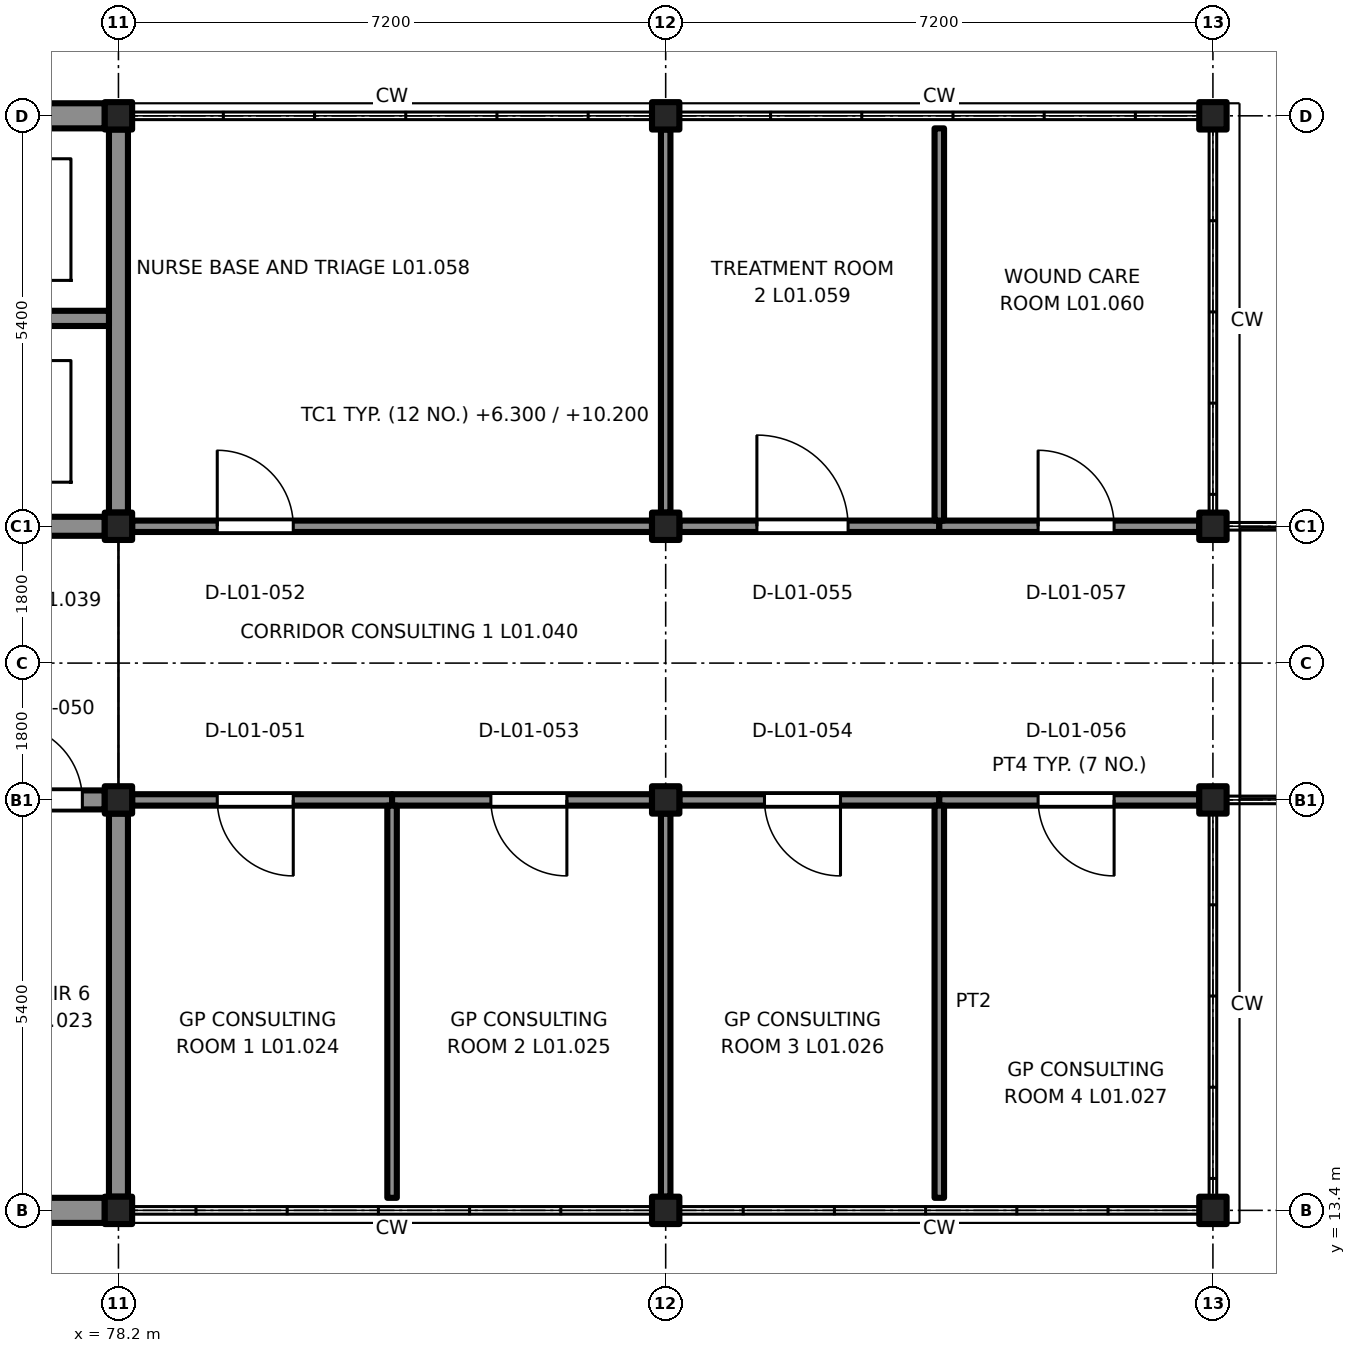
"""IFC4 building model, lengths in metres.
Left out: names, types, materials, properties, quantities, classifications, styles, units other than length and angle.
Written with IfcOpenShell. Run it as: python <this file> out.ifc"""

import sys

from ifc_helpers import new_model, si_unit, direction, frame, frame_2d, origin, origin_2d, place, context, subcontext, project, spatial, rectangle, extrude, element, fill, save


model = new_model("IFC4")
c1 = context("Model", 3, precision=1e-05, world=origin(), true_north=direction((0.0, 1.0)))
c2 = subcontext(c1, "Body", "Model", "MODEL_VIEW")
j1 = project(units=[si_unit("LENGTHUNIT", "METRE"), si_unit("PLANEANGLEUNIT", "RADIAN")], contexts=[c1])
p1 = place(None, origin())
s1 = spatial("IfcSite", under=j1, at=p1, CompositionType="ELEMENT")
p2 = place(p1, origin())
s2 = spatial("IfcBuilding", under=s1, at=p2, CompositionType="ELEMENT")
p3 = place(p2, frame((0.0, 0.0, 6.3)))
s3 = spatial("IfcBuildingStorey", under=s2, at=p3, CompositionType="ELEMENT", Elevation=6.3)
for number, where, z_axis, x_axis in (
    (1, (78.2, 13.4, 0.0), (0.0, 0.0, 1.0), (1.0, 0.0, 0.0)),
    (2, (78.2, 18.8, 0.0), (0.0, 0.0, 1.0), (1.0, 0.0, 0.0)),
    (3, (78.2, 22.4, 0.0), (0.0, 0.0, 1.0), (1.0, 0.0, 0.0)),
    (4, (78.2, 27.8, 0.0), (0.0, 0.0, 1.0), (1.0, 0.0, 0.0)),
    (5, (85.4, 13.4, 0.0), (0.0, 0.0, 1.0), (1.0, 0.0, 0.0)),
    (6, (85.4, 18.8, 0.0), (0.0, 0.0, 1.0), (1.0, 0.0, 0.0)),
    (7, (85.4, 22.4, 0.0), (0.0, 0.0, 1.0), (1.0, 0.0, 0.0)),
    (8, (85.4, 27.8, 0.0), (0.0, 0.0, 1.0), (1.0, 0.0, 0.0)),
    (9, (92.6, 13.4, 0.0), (0.0, 0.0, 1.0), (1.0, 0.0, 0.0)),
    (10, (92.6, 18.8, 0.0), (0.0, 0.0, 1.0), (1.0, 0.0, 0.0)),
    (11, (92.6, 22.4, 0.0), (0.0, 0.0, 1.0), (1.0, 0.0, 0.0)),
    (12, (92.6, 27.8, 0.0), (0.0, 0.0, 1.0), (1.0, 0.0, 0.0)),
):
    element("IfcColumn", number, at=place(p3, frame(where, z_axis=z_axis, x_axis=x_axis)), inside=s3, PredefinedType="COLUMN", context=c2, shape_type="SweptSolid", body=[
        extrude(rectangle(XDim=0.36, YDim=0.36, at=origin_2d()), origin(), (0.0, 0.0, 1.0), 3.9),
    ])
p4 = place(p3, frame((71.165, 18.8, 0.0), z_axis=(0.0, 0.0, 1.0), x_axis=(1.0, 0.0, 0.0)))
e13 = element("IfcWall", 13, at=p4, inside=s3, PredefinedType="SHEAR", context=c2, shape_type="SweptSolid", body=[
    extrude(rectangle(XDim=6.855, YDim=0.25, at=frame_2d((3.427, 0.0))), origin(), (0.0, 0.0, 1.0), 3.65),
])
p5 = place(p4, frame((5.56, 0.0, 0.0)))
e14 = element("IfcOpeningElement", 14, at=p5, cuts=e13, PredefinedType="OPENING", context=c2, shape_type="SweptSolid", body=[
    extrude(rectangle(XDim=1.0, YDim=2.1, at=frame_2d((0.5, 1.05))), frame((0.0, 0.135, 0.0), z_axis=(0.0, -1.0, 0.0), x_axis=(1.0, 0.0, 0.0)), (0.0, 0.0, 1.0), 0.27),
])
p6 = place(p3, frame((78.2, 13.58, 0.0), z_axis=(0.0, 0.0, 1.0), x_axis=(0.0, 1.0, 0.0)))
e15 = element("IfcWall", 15, at=p6, inside=s3, PredefinedType="SHEAR", context=c2, shape_type="SweptSolid", body=[
    extrude(rectangle(XDim=5.04, YDim=0.25, at=frame_2d((2.52, 0.0))), origin(), (0.0, 0.0, 1.0), 3.65),
])
p7 = place(p3, frame((71.165, 22.4, 0.0), z_axis=(0.0, 0.0, 1.0), x_axis=(1.0, 0.0, 0.0)))
e16 = element("IfcWall", 16, at=p7, inside=s3, PredefinedType="SHEAR", context=c2, shape_type="SweptSolid", body=[
    extrude(rectangle(XDim=6.855, YDim=0.25, at=frame_2d((3.427, 0.0))), origin(), (0.0, 0.0, 1.0), 3.65),
])
p8 = place(p7, frame((0.955, 0.0, 0.0)))
e17 = element("IfcOpeningElement", 17, at=p8, cuts=e16, PredefinedType="OPENING", context=c2, shape_type="SweptSolid", body=[
    extrude(rectangle(XDim=1.8, YDim=2.1, at=frame_2d((0.9, 1.05))), frame((0.0, 0.135, 0.0), z_axis=(0.0, -1.0, 0.0), x_axis=(1.0, 0.0, 0.0)), (0.0, 0.0, 1.0), 0.27),
])
p9 = place(p3, frame((78.2, 22.58, 0.0), z_axis=(0.0, 0.0, 1.0), x_axis=(0.0, 1.0, 0.0)))
e18 = element("IfcWall", 18, at=p9, inside=s3, PredefinedType="SHEAR", context=c2, shape_type="SweptSolid", body=[
    extrude(rectangle(XDim=5.04, YDim=0.25, at=frame_2d((2.52, 0.0))), origin(), (0.0, 0.0, 1.0), 3.65),
])
p10 = place(p3, frame((78.075, 25.135, 0.0), z_axis=(0.0, 0.0, 1.0), x_axis=(-1.0, 0.0, 0.0)))
e19 = element("IfcWall", 19, at=p10, inside=s3, PredefinedType="SHEAR", context=c2, shape_type="SweptSolid", body=[
    extrude(rectangle(XDim=3.0, YDim=0.2, at=frame_2d((1.5, 0.0))), origin(), (0.0, 0.0, 1.0), 3.65),
])
for number, where, z_axis, x_axis in (
    (20, (78.02, 13.4, 0.0), (0.0, 0.0, 1.0), (-1.0, 0.0, 0.0)),
    (21, (75.5, 27.8, 0.0), (0.0, 0.0, 1.0), (1.0, 0.0, 0.0)),
):
    element("IfcWall", number, at=place(p3, frame(where, z_axis=z_axis, x_axis=x_axis)), inside=s3, PredefinedType="SOLIDWALL", context=c2, shape_type="SweptSolid", body=[
        extrude(rectangle(XDim=2.52, YDim=0.33, at=frame_2d((1.26, 0.0))), origin(), (0.0, 0.0, 1.0), 3.22),
    ])
p11 = place(p3, frame((81.8, 18.8, 0.0), z_axis=(0.0, 0.0, 1.0), x_axis=(-1.0, 0.0, 0.0)))
e22 = element("IfcWall", 22, at=p11, inside=s3, PredefinedType="PARTITIONING", context=c2, shape_type="SweptSolid", body=[
    extrude(rectangle(XDim=3.42, YDim=0.15, at=frame_2d((1.71, 0.0))), origin(), (0.0, 0.0, 1.0), 3.22),
])
p12 = place(p11, frame((1.3, 0.0, 0.0)))
e23 = element("IfcOpeningElement", 23, at=p12, cuts=e22, PredefinedType="OPENING", context=c2, shape_type="SweptSolid", body=[
    extrude(rectangle(XDim=1.0, YDim=2.1, at=frame_2d((0.5, 1.05))), frame((0.0, 0.085, 0.0), z_axis=(0.0, -1.0, 0.0), x_axis=(1.0, 0.0, 0.0)), (0.0, 0.0, 1.0), 0.17),
])
p13 = place(p3, frame((85.22, 18.8, 0.0), z_axis=(0.0, 0.0, 1.0), x_axis=(-1.0, 0.0, 0.0)))
e24 = element("IfcWall", 24, at=p13, inside=s3, PredefinedType="PARTITIONING", context=c2, shape_type="SweptSolid", body=[
    extrude(rectangle(XDim=3.42, YDim=0.15, at=frame_2d((1.71, 0.0))), origin(), (0.0, 0.0, 1.0), 3.22),
])
p14 = place(p13, frame((1.12, 0.0, 0.0)))
e25 = element("IfcOpeningElement", 25, at=p14, cuts=e24, PredefinedType="OPENING", context=c2, shape_type="SweptSolid", body=[
    extrude(rectangle(XDim=1.0, YDim=2.1, at=frame_2d((0.5, 1.05))), frame((0.0, 0.085, 0.0), z_axis=(0.0, -1.0, 0.0), x_axis=(1.0, 0.0, 0.0)), (0.0, 0.0, 1.0), 0.17),
])
p15 = place(p3, frame((81.8, 13.565, 0.0), z_axis=(0.0, 0.0, 1.0), x_axis=(0.0, 1.0, 0.0)))
e26 = element("IfcWall", 26, at=p15, inside=s3, PredefinedType="PARTITIONING", context=c2, shape_type="SweptSolid", body=[
    extrude(rectangle(XDim=5.16, YDim=0.125, at=frame_2d((2.58, 0.0))), origin(), (0.0, 0.0, 1.0), 3.38),
])
p16 = place(p3, frame((89.0, 18.8, 0.0), z_axis=(0.0, 0.0, 1.0), x_axis=(-1.0, 0.0, 0.0)))
e27 = element("IfcWall", 27, at=p16, inside=s3, PredefinedType="PARTITIONING", context=c2, shape_type="SweptSolid", body=[
    extrude(rectangle(XDim=3.42, YDim=0.15, at=frame_2d((1.71, 0.0))), origin(), (0.0, 0.0, 1.0), 3.22),
])
p17 = place(p16, frame((1.3, 0.0, 0.0)))
e28 = element("IfcOpeningElement", 28, at=p17, cuts=e27, PredefinedType="OPENING", context=c2, shape_type="SweptSolid", body=[
    extrude(rectangle(XDim=1.0, YDim=2.1, at=frame_2d((0.5, 1.05))), frame((0.0, 0.085, 0.0), z_axis=(0.0, -1.0, 0.0), x_axis=(1.0, 0.0, 0.0)), (0.0, 0.0, 1.0), 0.17),
])
p18 = place(p3, frame((85.4, 13.58, 0.0), z_axis=(0.0, 0.0, 1.0), x_axis=(0.0, 1.0, 0.0)))
e29 = element("IfcWall", 29, at=p18, inside=s3, PredefinedType="PARTITIONING", context=c2, shape_type="SweptSolid", body=[
    extrude(rectangle(XDim=5.04, YDim=0.125, at=frame_2d((2.52, 0.0))), origin(), (0.0, 0.0, 1.0), 3.38),
])
p19 = place(p3, frame((92.42, 18.8, 0.0), z_axis=(0.0, 0.0, 1.0), x_axis=(-1.0, 0.0, 0.0)))
e30 = element("IfcWall", 30, at=p19, inside=s3, PredefinedType="PARTITIONING", context=c2, shape_type="SweptSolid", body=[
    extrude(rectangle(XDim=3.42, YDim=0.15, at=frame_2d((1.71, 0.0))), origin(), (0.0, 0.0, 1.0), 3.22),
])
p20 = place(p19, frame((1.12, 0.0, 0.0)))
e31 = element("IfcOpeningElement", 31, at=p20, cuts=e30, PredefinedType="OPENING", context=c2, shape_type="SweptSolid", body=[
    extrude(rectangle(XDim=1.0, YDim=2.1, at=frame_2d((0.5, 1.05))), frame((0.0, 0.085, 0.0), z_axis=(0.0, -1.0, 0.0), x_axis=(1.0, 0.0, 0.0)), (0.0, 0.0, 1.0), 0.17),
])
p21 = place(p3, frame((89.0, 13.565, 0.0), z_axis=(0.0, 0.0, 1.0), x_axis=(0.0, 1.0, 0.0)))
e32 = element("IfcWall", 32, at=p21, inside=s3, PredefinedType="PARTITIONING", context=c2, shape_type="SweptSolid", body=[
    extrude(rectangle(XDim=5.16, YDim=0.125, at=frame_2d((2.58, 0.0))), origin(), (0.0, 0.0, 1.0), 3.38),
])
p22 = place(p3, frame((78.38, 22.4, 0.0), z_axis=(0.0, 0.0, 1.0), x_axis=(1.0, 0.0, 0.0)))
e33 = element("IfcWall", 33, at=p22, inside=s3, PredefinedType="PARTITIONING", context=c2, shape_type="SweptSolid", body=[
    extrude(rectangle(XDim=6.84, YDim=0.15, at=frame_2d((3.42, 0.0))), origin(), (0.0, 0.0, 1.0), 3.22),
])
p23 = place(p22, frame((1.12, 0.0, 0.0)))
e34 = element("IfcOpeningElement", 34, at=p23, cuts=e33, PredefinedType="OPENING", context=c2, shape_type="SweptSolid", body=[
    extrude(rectangle(XDim=1.0, YDim=2.1, at=frame_2d((0.5, 1.05))), frame((0.0, 0.085, 0.0), z_axis=(0.0, -1.0, 0.0), x_axis=(1.0, 0.0, 0.0)), (0.0, 0.0, 1.0), 0.17),
])
p24 = place(p3, frame((85.58, 22.4, 0.0), z_axis=(0.0, 0.0, 1.0), x_axis=(1.0, 0.0, 0.0)))
e35 = element("IfcWall", 35, at=p24, inside=s3, PredefinedType="PARTITIONING", context=c2, shape_type="SweptSolid", body=[
    extrude(rectangle(XDim=3.42, YDim=0.15, at=frame_2d((1.71, 0.0))), origin(), (0.0, 0.0, 1.0), 3.22),
])
p25 = place(p24, frame((1.02, 0.0, 0.0)))
e36 = element("IfcOpeningElement", 36, at=p25, cuts=e35, PredefinedType="OPENING", context=c2, shape_type="SweptSolid", body=[
    extrude(rectangle(XDim=1.2, YDim=2.1, at=frame_2d((0.6, 1.05))), frame((0.0, 0.085, 0.0), z_axis=(0.0, -1.0, 0.0), x_axis=(1.0, 0.0, 0.0)), (0.0, 0.0, 1.0), 0.17),
])
p26 = place(p3, frame((85.4, 27.62, 0.0), z_axis=(0.0, 0.0, 1.0), x_axis=(0.0, -1.0, 0.0)))
e37 = element("IfcWall", 37, at=p26, inside=s3, PredefinedType="PARTITIONING", context=c2, shape_type="SweptSolid", body=[
    extrude(rectangle(XDim=5.04, YDim=0.125, at=frame_2d((2.52, 0.0))), origin(), (0.0, 0.0, 1.0), 3.38),
])
p27 = place(p3, frame((89.0, 22.4, 0.0), z_axis=(0.0, 0.0, 1.0), x_axis=(1.0, 0.0, 0.0)))
e38 = element("IfcWall", 38, at=p27, inside=s3, PredefinedType="PARTITIONING", context=c2, shape_type="SweptSolid", body=[
    extrude(rectangle(XDim=3.42, YDim=0.15, at=frame_2d((1.71, 0.0))), origin(), (0.0, 0.0, 1.0), 3.22),
])
p28 = place(p27, frame((1.3, 0.0, 0.0)))
e39 = element("IfcOpeningElement", 39, at=p28, cuts=e38, PredefinedType="OPENING", context=c2, shape_type="SweptSolid", body=[
    extrude(rectangle(XDim=1.0, YDim=2.1, at=frame_2d((0.5, 1.05))), frame((0.0, 0.085, 0.0), z_axis=(0.0, -1.0, 0.0), x_axis=(1.0, 0.0, 0.0)), (0.0, 0.0, 1.0), 0.17),
])
p29 = place(p3, frame((89.0, 27.635, 0.0), z_axis=(0.0, 0.0, 1.0), x_axis=(0.0, -1.0, 0.0)))
e40 = element("IfcWall", 40, at=p29, inside=s3, PredefinedType="PARTITIONING", context=c2, shape_type="SweptSolid", body=[
    extrude(rectangle(XDim=5.16, YDim=0.125, at=frame_2d((2.58, 0.0))), origin(), (0.0, 0.0, 1.0), 3.38),
])
p30 = place(p5, origin())
e41 = element("IfcDoor", 41, at=p30, inside=s3, OperationType="SINGLE_SWING_RIGHT", PredefinedType="DOOR", context=c2, shape_type="SweptSolid", body=[
    extrude(rectangle(XDim=1.0, YDim=2.1, at=frame_2d((0.5, 1.05))), frame((0.0, 0.025, 0.0), z_axis=(0.0, -1.0, 0.0), x_axis=(1.0, 0.0, 0.0)), (0.0, 0.0, 1.0), 0.05),
])
fill(e14, e41)
p31 = place(p12, origin())
e42 = element("IfcDoor", 42, at=p31, inside=s3, OperationType="SINGLE_SWING_RIGHT", PredefinedType="DOOR", context=c2, shape_type="SweptSolid", body=[
    extrude(rectangle(XDim=1.0, YDim=2.1, at=frame_2d((0.5, 1.05))), frame((0.0, 0.025, 0.0), z_axis=(0.0, -1.0, 0.0), x_axis=(1.0, 0.0, 0.0)), (0.0, 0.0, 1.0), 0.05),
])
fill(e23, e42)
p32 = place(p14, origin())
e43 = element("IfcDoor", 43, at=p32, inside=s3, OperationType="SINGLE_SWING_LEFT", PredefinedType="DOOR", context=c2, shape_type="SweptSolid", body=[
    extrude(rectangle(XDim=1.0, YDim=2.1, at=frame_2d((0.5, 1.05))), frame((0.0, 0.025, 0.0), z_axis=(0.0, -1.0, 0.0), x_axis=(1.0, 0.0, 0.0)), (0.0, 0.0, 1.0), 0.05),
])
fill(e25, e43)
p33 = place(p17, origin())
e44 = element("IfcDoor", 44, at=p33, inside=s3, OperationType="SINGLE_SWING_RIGHT", PredefinedType="DOOR", context=c2, shape_type="SweptSolid", body=[
    extrude(rectangle(XDim=1.0, YDim=2.1, at=frame_2d((0.5, 1.05))), frame((0.0, 0.025, 0.0), z_axis=(0.0, -1.0, 0.0), x_axis=(1.0, 0.0, 0.0)), (0.0, 0.0, 1.0), 0.05),
])
fill(e28, e44)
p34 = place(p20, origin())
e45 = element("IfcDoor", 45, at=p34, inside=s3, OperationType="SINGLE_SWING_LEFT", PredefinedType="DOOR", context=c2, shape_type="SweptSolid", body=[
    extrude(rectangle(XDim=1.0, YDim=2.1, at=frame_2d((0.5, 1.05))), frame((0.0, 0.025, 0.0), z_axis=(0.0, -1.0, 0.0), x_axis=(1.0, 0.0, 0.0)), (0.0, 0.0, 1.0), 0.05),
])
fill(e31, e45)
p35 = place(p23, origin())
e46 = element("IfcDoor", 46, at=p35, inside=s3, OperationType="SINGLE_SWING_LEFT", PredefinedType="DOOR", context=c2, shape_type="SweptSolid", body=[
    extrude(rectangle(XDim=1.0, YDim=2.1, at=frame_2d((0.5, 1.05))), frame((0.0, 0.025, 0.0), z_axis=(0.0, -1.0, 0.0), x_axis=(1.0, 0.0, 0.0)), (0.0, 0.0, 1.0), 0.05),
])
fill(e34, e46)
p36 = place(p25, origin())
e47 = element("IfcDoor", 47, at=p36, inside=s3, OperationType="SINGLE_SWING_LEFT", PredefinedType="DOOR", context=c2, shape_type="SweptSolid", body=[
    extrude(rectangle(XDim=1.2, YDim=2.1, at=frame_2d((0.6, 1.05))), frame((0.0, 0.025, 0.0), z_axis=(0.0, -1.0, 0.0), x_axis=(1.0, 0.0, 0.0)), (0.0, 0.0, 1.0), 0.05),
])
fill(e36, e47)
p37 = place(p28, origin())
e48 = element("IfcDoor", 48, at=p37, inside=s3, OperationType="SINGLE_SWING_RIGHT", PredefinedType="DOOR", context=c2, shape_type="SweptSolid", body=[
    extrude(rectangle(XDim=1.0, YDim=2.1, at=frame_2d((0.5, 1.05))), frame((0.0, 0.025, 0.0), z_axis=(0.0, -1.0, 0.0), x_axis=(1.0, 0.0, 0.0)), (0.0, 0.0, 1.0), 0.05),
])
fill(e39, e48)
save(model, sys.argv[1])
